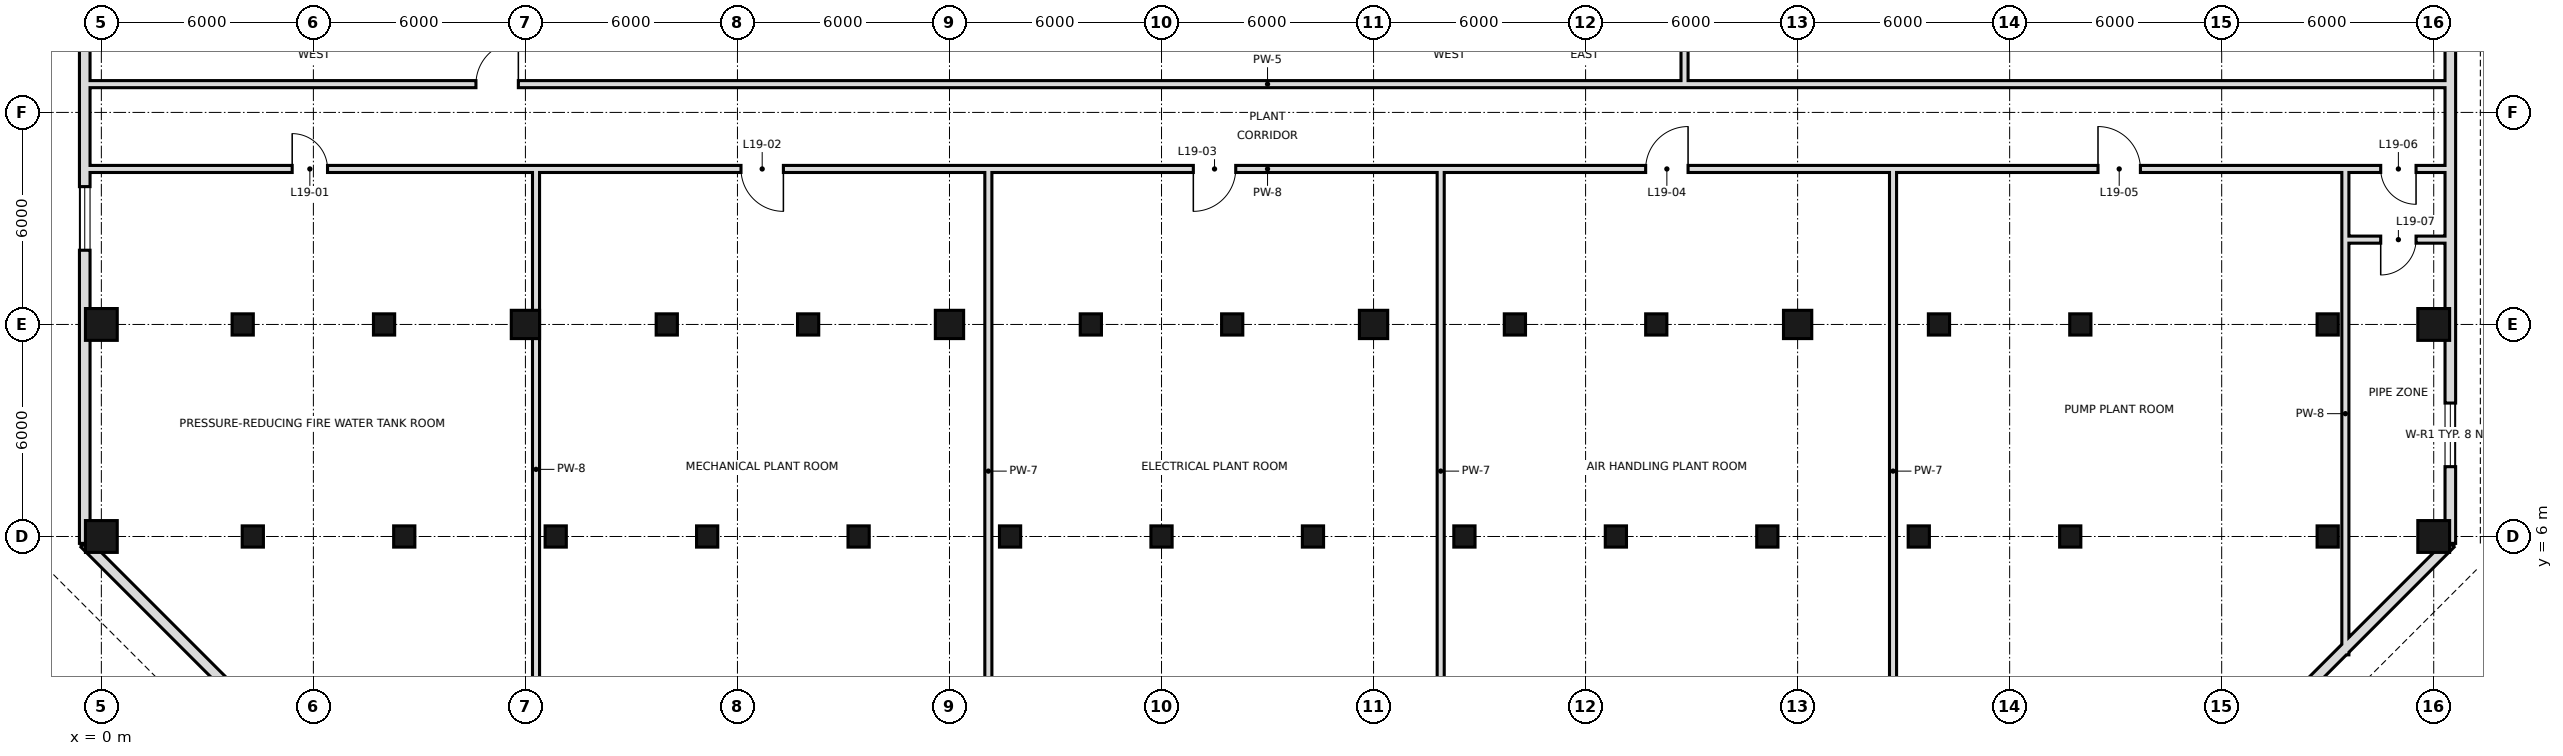
"""IFC4 building model, lengths in metres.
Left out: names, types, materials, properties, quantities, classifications, styles, units other than length and angle.
Written with IfcOpenShell. Run it as: python <this file> out.ifc"""

import sys

from ifc_helpers import new_model, si_unit, direction, frame, frame_2d, origin, origin_2d, place, context, subcontext, project, spatial, rectangle, hollow_rectangle, extrude, element, fill, save


model = new_model("IFC4")
c1 = context("Model", 3, precision=1e-05, world=origin(), true_north=direction((0.0, 1.0)))
c2 = subcontext(c1, "Body", "Model", "MODEL_VIEW")
j1 = project(units=[si_unit("LENGTHUNIT", "METRE"), si_unit("PLANEANGLEUNIT", "RADIAN")], contexts=[c1])
p1 = place(None, origin())
s1 = spatial("IfcSite", under=j1, at=p1, CompositionType="ELEMENT")
p2 = place(p1, origin())
s2 = spatial("IfcBuilding", under=s1, at=p2, CompositionType="ELEMENT")
p3 = place(p2, frame((0.0, 0.0, 90.2)))
s3 = spatial("IfcBuildingStorey", under=s2, at=p3, CompositionType="ELEMENT", Elevation=90.2)
p4 = place(p3, frame((0.0, 6.0, 0.0), z_axis=(0.0, 0.0, 1.0), x_axis=(1.0, 0.0, 0.0)))
e1 = element("IfcColumn", 1, at=p4, inside=s3, PredefinedType="COLUMN", context=c2, shape_type="SweptSolid", body=[
    extrude(hollow_rectangle(XDim=0.9, YDim=0.9, WallThickness=0.045, at=origin_2d()), origin(), (0.0, 0.0, 1.0), 5.7),
])
p5 = place(p3, frame((0.0, 12.0, 0.0), z_axis=(0.0, 0.0, 1.0), x_axis=(1.0, 0.0, 0.0)))
e2 = element("IfcColumn", 2, at=p5, inside=s3, PredefinedType="COLUMN", context=c2, shape_type="SweptSolid", body=[
    extrude(hollow_rectangle(XDim=0.9, YDim=0.9, WallThickness=0.045, at=origin_2d()), origin(), (0.0, 0.0, 1.0), 6.0),
])
for number, where, z_axis, x_axis in (
    (3, (12.0, 12.0, 0.0), (0.0, 0.0, 1.0), (1.0, 0.0, 0.0)),
    (4, (24.0, 12.0, 0.0), (0.0, 0.0, 1.0), (1.0, 0.0, 0.0)),
    (5, (36.0, 12.0, 0.0), (0.0, 0.0, 1.0), (1.0, 0.0, 0.0)),
    (6, (48.0, 12.0, 0.0), (0.0, 0.0, 1.0), (1.0, 0.0, 0.0)),
):
    element("IfcColumn", number, at=place(p3, frame(where, z_axis=z_axis, x_axis=x_axis)), inside=s3, PredefinedType="COLUMN", context=c2, shape_type="SweptSolid", body=[
        extrude(hollow_rectangle(XDim=0.8, YDim=0.8, WallThickness=0.04, at=origin_2d()), origin(), (0.0, 0.0, 1.0), 6.0),
    ])
for number, where, z_axis, x_axis in (
    (7, (66.0, 6.0, 0.0), (0.0, 0.0, 1.0), (1.0, 0.0, 0.0)),
    (8, (66.0, 12.0, 0.0), (0.0, 0.0, 1.0), (1.0, 0.0, 0.0)),
):
    element("IfcColumn", number, at=place(p3, frame(where, z_axis=z_axis, x_axis=x_axis)), inside=s3, PredefinedType="COLUMN", context=c2, shape_type="SweptSolid", body=[
        extrude(hollow_rectangle(XDim=0.9, YDim=0.9, WallThickness=0.045, at=origin_2d()), origin(), (0.0, 0.0, 1.0), 6.0),
    ])
for number, where, z_axis, x_axis in (
    (9, (4.286, 6.0, 1.2), (0.0, 0.0, 1.0), (1.0, 0.0, 0.0)),
    (10, (8.572, 6.0, 1.2), (0.0, 0.0, 1.0), (1.0, 0.0, 0.0)),
    (11, (12.857, 6.0, 1.2), (0.0, 0.0, 1.0), (1.0, 0.0, 0.0)),
    (12, (17.143, 6.0, 1.2), (0.0, 0.0, 1.0), (1.0, 0.0, 0.0)),
    (13, (21.428, 6.0, 1.2), (0.0, 0.0, 1.0), (1.0, 0.0, 0.0)),
    (14, (25.714, 6.0, 1.2), (0.0, 0.0, 1.0), (1.0, 0.0, 0.0)),
    (15, (30.0, 6.0, 1.2), (0.0, 0.0, 1.0), (1.0, 0.0, 0.0)),
    (16, (34.286, 6.0, 1.2), (0.0, 0.0, 1.0), (1.0, 0.0, 0.0)),
    (17, (38.572, 6.0, 1.2), (0.0, 0.0, 1.0), (1.0, 0.0, 0.0)),
    (18, (42.857, 6.0, 1.2), (0.0, 0.0, 1.0), (1.0, 0.0, 0.0)),
    (19, (47.143, 6.0, 1.2), (0.0, 0.0, 1.0), (1.0, 0.0, 0.0)),
    (20, (51.428, 6.0, 1.2), (0.0, 0.0, 1.0), (1.0, 0.0, 0.0)),
    (21, (55.714, 6.0, 1.2), (0.0, 0.0, 1.0), (1.0, 0.0, 0.0)),
    (22, (63.0, 6.0, 1.2), (0.0, 0.0, 1.0), (1.0, 0.0, 0.0)),
    (23, (4.0, 12.0, 1.2), (0.0, 0.0, 1.0), (1.0, 0.0, 0.0)),
    (24, (8.0, 12.0, 1.2), (0.0, 0.0, 1.0), (1.0, 0.0, 0.0)),
    (25, (16.0, 12.0, 1.2), (0.0, 0.0, 1.0), (1.0, 0.0, 0.0)),
    (26, (20.0, 12.0, 1.2), (0.0, 0.0, 1.0), (1.0, 0.0, 0.0)),
    (27, (28.0, 12.0, 1.2), (0.0, 0.0, 1.0), (1.0, 0.0, 0.0)),
    (28, (32.0, 12.0, 1.2), (0.0, 0.0, 1.0), (1.0, 0.0, 0.0)),
    (29, (40.0, 12.0, 1.2), (0.0, 0.0, 1.0), (1.0, 0.0, 0.0)),
    (30, (44.0, 12.0, 1.2), (0.0, 0.0, 1.0), (1.0, 0.0, 0.0)),
    (31, (52.0, 12.0, 1.2), (0.0, 0.0, 1.0), (1.0, 0.0, 0.0)),
    (32, (56.0, 12.0, 1.2), (0.0, 0.0, 1.0), (1.0, 0.0, 0.0)),
    (33, (63.0, 12.0, 1.2), (0.0, 0.0, 1.0), (1.0, 0.0, 0.0)),
):
    element("IfcColumn", number, at=place(p3, frame(where, z_axis=z_axis, x_axis=x_axis)), inside=s3, PredefinedType="COLUMN", context=c2, shape_type="SweptSolid", body=[
        extrude(hollow_rectangle(XDim=0.6, YDim=0.6, WallThickness=0.04, at=origin_2d()), origin(), (0.0, 0.0, 1.0), 3.3),
    ])
p6 = place(p3, frame((60.195, -0.47, 0.0), z_axis=(0.0, 0.0, 1.0), x_axis=(0.707106781187, 0.707106781187, 0.0)))
e34 = element("IfcWall", 34, at=p6, inside=s3, PredefinedType="SOLIDWALL", context=c2, shape_type="SweptSolid", body=[
    extrude(rectangle(XDim=8.875, YDim=0.3, at=frame_2d((4.438, 0.0))), origin(), (0.0, 0.0, 1.0), 5.7),
])
p7 = place(p6, frame((1.292, 0.0, 0.9)))
e35 = element("IfcOpeningElement", 35, at=p7, cuts=e34, PredefinedType="OPENING", context=c2, shape_type="SweptSolid", body=[
    extrude(rectangle(XDim=1.8, YDim=1.5, at=frame_2d((0.9, 0.75))), frame((0.0, 0.16, 0.0), z_axis=(0.0, -1.0, 0.0), x_axis=(1.0, 0.0, 0.0)), (0.0, 0.0, 1.0), 0.32),
])
p8 = place(p3, frame((66.47, 5.805, 0.0), z_axis=(0.0, 0.0, 1.0), x_axis=(0.0, 1.0, 0.0)))
e36 = element("IfcWall", 36, at=p8, inside=s3, PredefinedType="SOLIDWALL", context=c2, shape_type="SweptSolid", body=[
    extrude(rectangle(XDim=36.389, YDim=0.3, at=frame_2d((18.195, 0.0))), origin(), (0.0, 0.0, 1.0), 5.7),
])
p9 = place(p8, frame((2.17, 0.0, 0.9)))
e37 = element("IfcOpeningElement", 37, at=p9, cuts=e36, PredefinedType="OPENING", context=c2, shape_type="SweptSolid", body=[
    extrude(rectangle(XDim=1.8, YDim=1.5, at=frame_2d((0.9, 0.75))), frame((0.0, 0.16, 0.0), z_axis=(0.0, -1.0, 0.0), x_axis=(1.0, 0.0, 0.0)), (0.0, 0.0, 1.0), 0.32),
])
p10 = place(p8, frame((14.295, 0.0, 0.9)))
e38 = element("IfcOpeningElement", 38, at=p10, cuts=e36, PredefinedType="OPENING", context=c2, shape_type="SweptSolid", body=[
    extrude(rectangle(XDim=1.8, YDim=1.5, at=frame_2d((0.9, 0.75))), frame((0.0, 0.16, 0.0), z_axis=(0.0, -1.0, 0.0), x_axis=(1.0, 0.0, 0.0)), (0.0, 0.0, 1.0), 0.32),
])
p11 = place(p8, frame((26.295, 0.0, 0.9)))
e39 = element("IfcOpeningElement", 39, at=p11, cuts=e36, PredefinedType="OPENING", context=c2, shape_type="SweptSolid", body=[
    extrude(rectangle(XDim=1.8, YDim=1.5, at=frame_2d((0.9, 0.75))), frame((0.0, 0.16, 0.0), z_axis=(0.0, -1.0, 0.0), x_axis=(1.0, 0.0, 0.0)), (0.0, 0.0, 1.0), 0.32),
])
p12 = place(p3, frame((-0.47, 42.195, 0.0), z_axis=(0.0, 0.0, 1.0), x_axis=(0.0, -1.0, 0.0)))
e40 = element("IfcWall", 40, at=p12, inside=s3, PredefinedType="SOLIDWALL", context=c2, shape_type="SweptSolid", body=[
    extrude(rectangle(XDim=36.389, YDim=0.3, at=frame_2d((18.195, 0.0))), origin(), (0.0, 0.0, 1.0), 5.7),
])
p13 = place(p12, frame((2.17, 0.0, 0.9)))
e41 = element("IfcOpeningElement", 41, at=p13, cuts=e40, PredefinedType="OPENING", context=c2, shape_type="SweptSolid", body=[
    extrude(rectangle(XDim=1.8, YDim=1.5, at=frame_2d((0.9, 0.75))), frame((0.0, 0.16, 0.0), z_axis=(0.0, -1.0, 0.0), x_axis=(1.0, 0.0, 0.0)), (0.0, 0.0, 1.0), 0.32),
])
p14 = place(p12, frame((14.295, 0.0, 0.9)))
e42 = element("IfcOpeningElement", 42, at=p14, cuts=e40, PredefinedType="OPENING", context=c2, shape_type="SweptSolid", body=[
    extrude(rectangle(XDim=1.8, YDim=1.5, at=frame_2d((0.9, 0.75))), frame((0.0, 0.16, 0.0), z_axis=(0.0, -1.0, 0.0), x_axis=(1.0, 0.0, 0.0)), (0.0, 0.0, 1.0), 0.32),
])
p15 = place(p12, frame((26.295, 0.0, 0.9)))
e43 = element("IfcOpeningElement", 43, at=p15, cuts=e40, PredefinedType="OPENING", context=c2, shape_type="SweptSolid", body=[
    extrude(rectangle(XDim=1.8, YDim=1.5, at=frame_2d((0.9, 0.75))), frame((0.0, 0.16, 0.0), z_axis=(0.0, -1.0, 0.0), x_axis=(1.0, 0.0, 0.0)), (0.0, 0.0, 1.0), 0.32),
])
p16 = place(p3, frame((-0.47, 5.805, 0.0), z_axis=(0.0, 0.0, 1.0), x_axis=(0.707106781187, -0.707106781187, 0.0)))
e44 = element("IfcWall", 44, at=p16, inside=s3, PredefinedType="SOLIDWALL", context=c2, shape_type="SweptSolid", body=[
    extrude(rectangle(XDim=8.875, YDim=0.3, at=frame_2d((4.438, 0.0))), origin(), (0.0, 0.0, 1.0), 5.7),
])
p17 = place(p3, frame((12.3, -0.5, 0.0), z_axis=(0.0, 0.0, 1.0), x_axis=(0.0, 1.0, 0.0)))
e45 = element("IfcWall", 45, at=p17, inside=s3, PredefinedType="SOLIDWALL", context=c2, shape_type="SweptSolid", body=[
    extrude(rectangle(XDim=16.8, YDim=0.2, at=frame_2d((8.4, 0.0))), origin(), (0.0, 0.0, 1.0), 5.7),
])
for number, where, z_axis, x_axis in (
    (46, (25.1, -0.6, 0.0), (0.0, 0.0, 1.0), (0.0, 1.0, 0.0)),
    (47, (37.9, -0.6, 0.0), (0.0, 0.0, 1.0), (0.0, 1.0, 0.0)),
):
    element("IfcWall", number, at=place(p3, frame(where, z_axis=z_axis, x_axis=x_axis)), inside=s3, PredefinedType="SOLIDWALL", context=c2, shape_type="SweptSolid", body=[
        extrude(rectangle(XDim=16.9, YDim=0.2, at=frame_2d((8.45, 0.0))), origin(), (0.0, 0.0, 1.0), 5.7),
    ])
p18 = place(p3, frame((44.8, 18.9, 0.0), z_axis=(0.0, 0.0, 1.0), x_axis=(0.0, 1.0, 0.0)))
e48 = element("IfcWall", 48, at=p18, inside=s3, PredefinedType="SOLIDWALL", context=c2, shape_type="SweptSolid", body=[
    extrude(rectangle(XDim=29.7, YDim=0.2, at=frame_2d((14.85, 0.0))), origin(), (0.0, 0.0, 1.0), 5.25),
])
p19 = place(p18, frame((18.3, 0.0, 0.0)))
e49 = element("IfcOpeningElement", 49, at=p19, cuts=e48, PredefinedType="OPENING", context=c2, shape_type="SweptSolid", body=[
    extrude(rectangle(XDim=1.2, YDim=2.4, at=frame_2d((0.6, 1.2))), frame((0.0, 0.11, 0.0), z_axis=(0.0, -1.0, 0.0), x_axis=(1.0, 0.0, 0.0)), (0.0, 0.0, 1.0), 0.22),
])
p20 = place(p3, frame((50.7, -0.6, 0.0), z_axis=(0.0, 0.0, 1.0), x_axis=(0.0, 1.0, 0.0)))
e50 = element("IfcWall", 50, at=p20, inside=s3, PredefinedType="SOLIDWALL", context=c2, shape_type="SweptSolid", body=[
    extrude(rectangle(XDim=16.9, YDim=0.2, at=frame_2d((8.45, 0.0))), origin(), (0.0, 0.0, 1.0), 5.7),
])
p21 = place(p3, frame((63.5, 2.651, 0.0), z_axis=(0.0, 0.0, 1.0), x_axis=(0.0, 1.0, 0.0)))
e51 = element("IfcWall", 51, at=p21, inside=s3, PredefinedType="SOLIDWALL", context=c2, shape_type="SweptSolid", body=[
    extrude(rectangle(XDim=13.649, YDim=0.2, at=frame_2d((6.825, 0.0))), origin(), (0.0, 0.0, 1.0), 5.7),
])
p22 = place(p3, frame((63.6, 14.4, 0.0), z_axis=(0.0, 0.0, 1.0), x_axis=(1.0, 0.0, 0.0)))
e52 = element("IfcWall", 52, at=p22, inside=s3, PredefinedType="SOLIDWALL", context=c2, shape_type="SweptSolid", body=[
    extrude(rectangle(XDim=3.0, YDim=0.2, at=frame_2d((1.5, 0.0))), origin(), (0.0, 0.0, 1.0), 5.7),
])
p23 = place(p22, frame((0.9, 0.0, 0.0)))
e53 = element("IfcOpeningElement", 53, at=p23, cuts=e52, PredefinedType="OPENING", context=c2, shape_type="SweptSolid", body=[
    extrude(rectangle(XDim=1.0, YDim=2.4, at=frame_2d((0.5, 1.2))), frame((0.0, 0.11, 0.0), z_axis=(0.0, -1.0, 0.0), x_axis=(1.0, 0.0, 0.0)), (0.0, 0.0, 1.0), 0.22),
])
p24 = place(p3, frame((-0.6, 16.4, 0.0), z_axis=(0.0, 0.0, 1.0), x_axis=(1.0, 0.0, 0.0)))
e54 = element("IfcWall", 54, at=p24, inside=s3, PredefinedType="SOLIDWALL", context=c2, shape_type="SweptSolid", body=[
    extrude(rectangle(XDim=67.2, YDim=0.2, at=frame_2d((33.6, 0.0))), origin(), (0.0, 0.0, 1.0), 5.0),
])
p25 = place(p24, frame((6.0, 0.0, 0.0)))
e55 = element("IfcOpeningElement", 55, at=p25, cuts=e54, PredefinedType="OPENING", context=c2, shape_type="SweptSolid", body=[
    extrude(rectangle(XDim=1.0, YDim=2.4, at=frame_2d((0.5, 1.2))), frame((0.0, 0.11, 0.0), z_axis=(0.0, -1.0, 0.0), x_axis=(1.0, 0.0, 0.0)), (0.0, 0.0, 1.0), 0.22),
])
p26 = place(p24, frame((18.7, 0.0, 0.0)))
e56 = element("IfcOpeningElement", 56, at=p26, cuts=e54, PredefinedType="OPENING", context=c2, shape_type="SweptSolid", body=[
    extrude(rectangle(XDim=1.2, YDim=2.4, at=frame_2d((0.6, 1.2))), frame((0.0, 0.11, 0.0), z_axis=(0.0, -1.0, 0.0), x_axis=(1.0, 0.0, 0.0)), (0.0, 0.0, 1.0), 0.22),
])
p27 = place(p24, frame((31.5, 0.0, 0.0)))
e57 = element("IfcOpeningElement", 57, at=p27, cuts=e54, PredefinedType="OPENING", context=c2, shape_type="SweptSolid", body=[
    extrude(rectangle(XDim=1.2, YDim=2.4, at=frame_2d((0.6, 1.2))), frame((0.0, 0.11, 0.0), z_axis=(0.0, -1.0, 0.0), x_axis=(1.0, 0.0, 0.0)), (0.0, 0.0, 1.0), 0.22),
])
p28 = place(p24, frame((44.3, 0.0, 0.0)))
e58 = element("IfcOpeningElement", 58, at=p28, cuts=e54, PredefinedType="OPENING", context=c2, shape_type="SweptSolid", body=[
    extrude(rectangle(XDim=1.2, YDim=2.4, at=frame_2d((0.6, 1.2))), frame((0.0, 0.11, 0.0), z_axis=(0.0, -1.0, 0.0), x_axis=(1.0, 0.0, 0.0)), (0.0, 0.0, 1.0), 0.22),
])
p29 = place(p24, frame((57.1, 0.0, 0.0)))
e59 = element("IfcOpeningElement", 59, at=p29, cuts=e54, PredefinedType="OPENING", context=c2, shape_type="SweptSolid", body=[
    extrude(rectangle(XDim=1.2, YDim=2.4, at=frame_2d((0.6, 1.2))), frame((0.0, 0.11, 0.0), z_axis=(0.0, -1.0, 0.0), x_axis=(1.0, 0.0, 0.0)), (0.0, 0.0, 1.0), 0.22),
])
p30 = place(p24, frame((65.1, 0.0, 0.0)))
e60 = element("IfcOpeningElement", 60, at=p30, cuts=e54, PredefinedType="OPENING", context=c2, shape_type="SweptSolid", body=[
    extrude(rectangle(XDim=1.0, YDim=2.4, at=frame_2d((0.5, 1.2))), frame((0.0, 0.11, 0.0), z_axis=(0.0, -1.0, 0.0), x_axis=(1.0, 0.0, 0.0)), (0.0, 0.0, 1.0), 0.22),
])
p31 = place(p3, frame((-0.6, 18.8, 0.0), z_axis=(0.0, 0.0, 1.0), x_axis=(1.0, 0.0, 0.0)))
e61 = element("IfcWall", 61, at=p31, inside=s3, PredefinedType="SOLIDWALL", context=c2, shape_type="SweptSolid", body=[
    extrude(rectangle(XDim=67.2, YDim=0.2, at=frame_2d((33.6, 0.0))), origin(), (0.0, 0.0, 1.0), 5.0),
])
p32 = place(p31, frame((11.2, 0.0, 0.0)))
e62 = element("IfcOpeningElement", 62, at=p32, cuts=e61, PredefinedType="OPENING", context=c2, shape_type="SweptSolid", body=[
    extrude(rectangle(XDim=1.2, YDim=2.4, at=frame_2d((0.6, 1.2))), frame((0.0, 0.11, 0.0), z_axis=(0.0, -1.0, 0.0), x_axis=(1.0, 0.0, 0.0)), (0.0, 0.0, 1.0), 0.22),
])
p33 = place(p9, origin())
e63 = element("IfcWindow", 63, at=p33, inside=s3, PartitioningType="SINGLE_PANEL", PredefinedType="WINDOW", context=c2, shape_type="SweptSolid", body=[
    extrude(rectangle(XDim=1.8, YDim=1.5, at=frame_2d((0.9, 0.75))), frame((0.0, 0.03, 0.0), z_axis=(0.0, -1.0, 0.0), x_axis=(1.0, 0.0, 0.0)), (0.0, 0.0, 1.0), 0.06),
])
fill(e37, e63)
p34 = place(p15, origin())
e64 = element("IfcWindow", 64, at=p34, inside=s3, PartitioningType="SINGLE_PANEL", PredefinedType="WINDOW", context=c2, shape_type="SweptSolid", body=[
    extrude(rectangle(XDim=1.8, YDim=1.5, at=frame_2d((0.9, 0.75))), frame((0.0, 0.03, 0.0), z_axis=(0.0, -1.0, 0.0), x_axis=(1.0, 0.0, 0.0)), (0.0, 0.0, 1.0), 0.06),
])
fill(e43, e64)
p35 = place(p25, origin())
e65 = element("IfcDoor", 65, at=p35, inside=s3, OperationType="SINGLE_SWING_LEFT", PredefinedType="DOOR", context=c2, shape_type="SweptSolid", body=[
    extrude(rectangle(XDim=1.0, YDim=2.4, at=frame_2d((0.5, 1.2))), frame((0.0, 0.025, 0.0), z_axis=(0.0, -1.0, 0.0), x_axis=(1.0, 0.0, 0.0)), (0.0, 0.0, 1.0), 0.05),
])
fill(e55, e65)
p36 = place(p26, origin())
e66 = element("IfcDoor", 66, at=p36, inside=s3, OperationType="SINGLE_SWING_RIGHT", PredefinedType="DOOR", context=c2, shape_type="SweptSolid", body=[
    extrude(rectangle(XDim=1.2, YDim=2.4, at=frame_2d((0.6, 1.2))), frame((0.0, 0.025, 0.0), z_axis=(0.0, -1.0, 0.0), x_axis=(1.0, 0.0, 0.0)), (0.0, 0.0, 1.0), 0.05),
])
fill(e56, e66)
p37 = place(p27, frame((1.2, 0.0, 0.0), z_axis=(0.0, 0.0, 1.0), x_axis=(-1.0, 0.0, 0.0)))
e67 = element("IfcDoor", 67, at=p37, inside=s3, OperationType="SINGLE_SWING_RIGHT", PredefinedType="DOOR", context=c2, shape_type="SweptSolid", body=[
    extrude(rectangle(XDim=1.2, YDim=2.4, at=frame_2d((0.6, 1.2))), frame((0.0, 0.025, 0.0), z_axis=(0.0, -1.0, 0.0), x_axis=(1.0, 0.0, 0.0)), (0.0, 0.0, 1.0), 0.05),
])
fill(e57, e67)
p38 = place(p28, frame((1.2, 0.0, 0.0), z_axis=(0.0, 0.0, 1.0), x_axis=(-1.0, 0.0, 0.0)))
e68 = element("IfcDoor", 68, at=p38, inside=s3, OperationType="SINGLE_SWING_LEFT", PredefinedType="DOOR", context=c2, shape_type="SweptSolid", body=[
    extrude(rectangle(XDim=1.2, YDim=2.4, at=frame_2d((0.6, 1.2))), frame((0.0, 0.025, 0.0), z_axis=(0.0, -1.0, 0.0), x_axis=(1.0, 0.0, 0.0)), (0.0, 0.0, 1.0), 0.05),
])
fill(e58, e68)
p39 = place(p29, origin())
e69 = element("IfcDoor", 69, at=p39, inside=s3, OperationType="SINGLE_SWING_LEFT", PredefinedType="DOOR", context=c2, shape_type="SweptSolid", body=[
    extrude(rectangle(XDim=1.2, YDim=2.4, at=frame_2d((0.6, 1.2))), frame((0.0, 0.025, 0.0), z_axis=(0.0, -1.0, 0.0), x_axis=(1.0, 0.0, 0.0)), (0.0, 0.0, 1.0), 0.05),
])
fill(e59, e69)
p40 = place(p30, origin())
e70 = element("IfcDoor", 70, at=p40, inside=s3, OperationType="SINGLE_SWING_RIGHT", PredefinedType="DOOR", context=c2, shape_type="SweptSolid", body=[
    extrude(rectangle(XDim=1.0, YDim=2.4, at=frame_2d((0.5, 1.2))), frame((0.0, 0.025, 0.0), z_axis=(0.0, -1.0, 0.0), x_axis=(1.0, 0.0, 0.0)), (0.0, 0.0, 1.0), 0.05),
])
fill(e60, e70)
p41 = place(p23, frame((1.0, 0.0, 0.0), z_axis=(0.0, 0.0, 1.0), x_axis=(-1.0, 0.0, 0.0)))
e71 = element("IfcDoor", 71, at=p41, inside=s3, OperationType="SINGLE_SWING_RIGHT", PredefinedType="DOOR", context=c2, shape_type="SweptSolid", body=[
    extrude(rectangle(XDim=1.0, YDim=2.4, at=frame_2d((0.5, 1.2))), frame((0.0, 0.025, 0.0), z_axis=(0.0, -1.0, 0.0), x_axis=(1.0, 0.0, 0.0)), (0.0, 0.0, 1.0), 0.05),
])
fill(e53, e71)
p42 = place(p32, frame((1.2, 0.0, 0.0), z_axis=(0.0, 0.0, 1.0), x_axis=(-1.0, 0.0, 0.0)))
e72 = element("IfcDoor", 72, at=p42, inside=s3, OperationType="SINGLE_SWING_LEFT", PredefinedType="DOOR", context=c2, shape_type="SweptSolid", body=[
    extrude(rectangle(XDim=1.2, YDim=2.4, at=frame_2d((0.6, 1.2))), frame((0.0, 0.025, 0.0), z_axis=(0.0, -1.0, 0.0), x_axis=(1.0, 0.0, 0.0)), (0.0, 0.0, 1.0), 0.05),
])
fill(e62, e72)
save(model, sys.argv[1])
